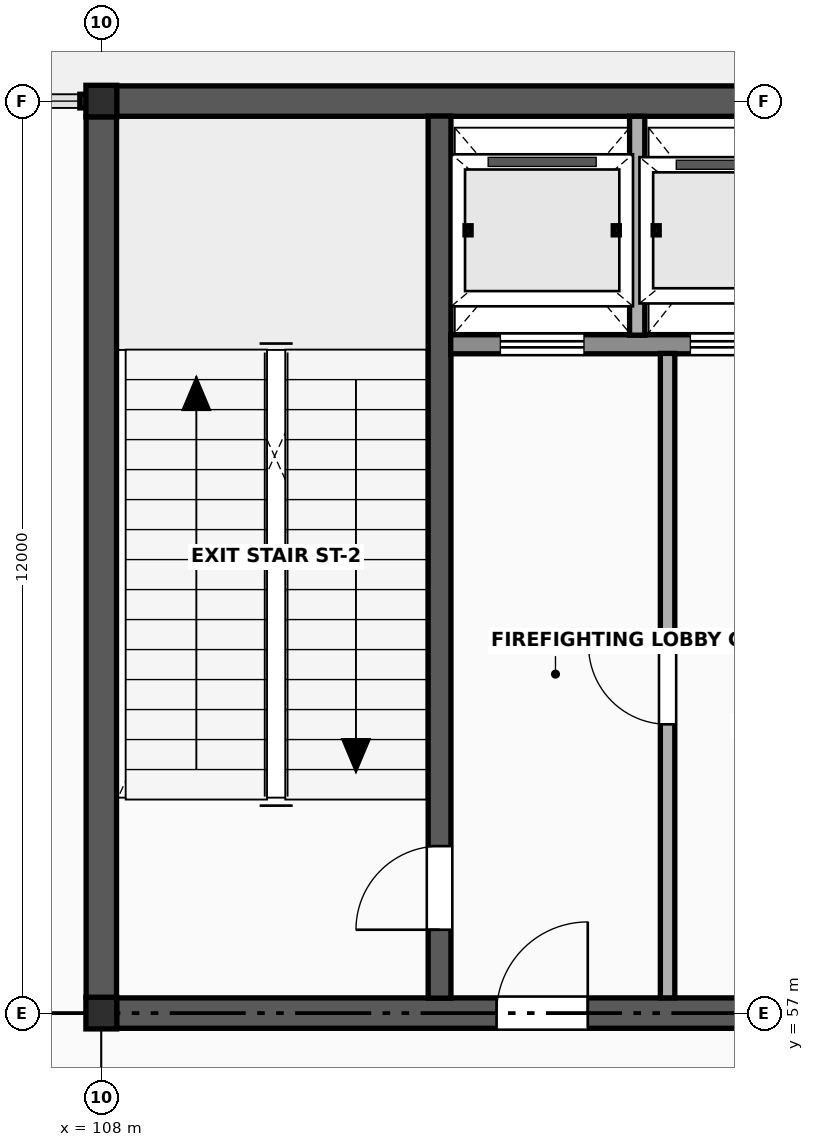
"""IFC4 building model, lengths in metres.
Left out: names, types, materials, properties, quantities, classifications, styles, units other than length and angle.
Written with IfcOpenShell. Run it as: python <this file> out.ifc"""

import sys

from ifc_helpers import new_model, si_unit, direction, frame, frame_2d, origin, origin_2d, place, context, subcontext, project, spatial, rectangle, i_section, extrude, element, fill, save


model = new_model("IFC4")
c1 = context("Model", 3, precision=1e-05, world=origin(), true_north=direction((0.0, 1.0)))
c2 = subcontext(c1, "Body", "Model", "MODEL_VIEW")
j1 = project(units=[si_unit("LENGTHUNIT", "METRE"), si_unit("PLANEANGLEUNIT", "RADIAN")], contexts=[c1])
p1 = place(None, origin())
s1 = spatial("IfcSite", under=j1, at=p1, CompositionType="ELEMENT")
p2 = place(p1, origin())
s2 = spatial("IfcBuilding", under=s1, at=p2, CompositionType="ELEMENT")
p3 = place(p2, frame((0.0, 0.0, 32.4)))
s3 = spatial("IfcBuildingStorey", under=s2, at=p3, CompositionType="ELEMENT", Elevation=32.4)
for number, where, z_axis, x_axis in (
    (1, (108.0, 57.0, 0.0), (0.0, 0.0, 1.0), (1.0, 0.0, 0.0)),
    (2, (108.0, 69.0, 0.0), (0.0, 0.0, 1.0), (1.0, 0.0, 0.0)),
):
    element("IfcColumn", number, at=place(p3, frame(where, z_axis=z_axis, x_axis=x_axis)), inside=s3, PredefinedType="COLUMN", context=c2, shape_type="SweptSolid", body=[
        extrude(i_section(OverallWidth=0.406, OverallDepth=0.416, WebThickness=0.03, FlangeThickness=0.048, FilletRadius=0.018, at=origin_2d()), origin(), (0.0, 0.0, 1.0), 5.2),
    ])
p4 = place(p3, frame((108.2, 57.0, 0.0), z_axis=(0.0, 0.0, 1.0), x_axis=(1.0, 0.0, 0.0)))
e3 = element("IfcWall", 3, at=p4, inside=s3, PredefinedType="SHEAR", context=c2, shape_type="SweptSolid", body=[
    extrude(rectangle(XDim=11.6, YDim=0.4, at=frame_2d((5.8, 0.0))), origin(), (0.0, 0.0, 1.0), 5.043),
])
p5 = place(p4, frame((5.0, 0.0, 0.0)))
e4 = element("IfcOpeningElement", 4, at=p5, cuts=e3, PredefinedType="OPENING", context=c2, shape_type="SweptSolid", body=[
    extrude(rectangle(XDim=1.2, YDim=2.2, at=frame_2d((0.6, 1.1))), frame((0.0, 0.215, 0.0), z_axis=(0.0, -1.0, 0.0), x_axis=(1.0, 0.0, 0.0)), (0.0, 0.0, 1.0), 0.43),
])
p6 = place(p4, frame((8.7, 0.0, 0.0)))
e5 = element("IfcOpeningElement", 5, at=p6, cuts=e3, PredefinedType="OPENING", context=c2, shape_type="SweptSolid", body=[
    extrude(rectangle(XDim=1.5, YDim=2.25, at=frame_2d((0.75, 1.125))), frame((0.0, 0.215, 0.0), z_axis=(0.0, -1.0, 0.0), x_axis=(1.0, 0.0, 0.0)), (0.0, 0.0, 1.0), 0.43),
])
p7 = place(p3, frame((108.2, 69.0, 0.0), z_axis=(0.0, 0.0, 1.0), x_axis=(1.0, 0.0, 0.0)))
e6 = element("IfcWall", 6, at=p7, inside=s3, PredefinedType="SHEAR", context=c2, shape_type="SweptSolid", body=[
    extrude(rectangle(XDim=11.6, YDim=0.4, at=frame_2d((5.8, 0.0))), origin(), (0.0, 0.0, 1.0), 5.043),
])
p8 = place(p3, frame((108.0, 57.205, 0.0), z_axis=(0.0, 0.0, 1.0), x_axis=(0.0, 1.0, 0.0)))
e7 = element("IfcWall", 7, at=p8, inside=s3, PredefinedType="SHEAR", context=c2, shape_type="SweptSolid", body=[
    extrude(rectangle(XDim=11.59, YDim=0.4, at=frame_2d((5.795, 0.0))), origin(), (0.0, 0.0, 1.0), 5.043),
])
p9 = place(p3, frame((112.45, 57.197, 0.0), z_axis=(0.0, 0.0, 1.0), x_axis=(0.0, 1.0, 0.0)))
e8 = element("IfcWall", 8, at=p9, inside=s3, PredefinedType="SHEAR", context=c2, shape_type="SweptSolid", body=[
    extrude(rectangle(XDim=11.606, YDim=0.3, at=frame_2d((5.803, 0.0))), origin(), (0.0, 0.0, 1.0), 5.043),
])
p10 = place(p9, frame((0.9, 0.0, 0.0)))
e9 = element("IfcOpeningElement", 9, at=p10, cuts=e8, PredefinedType="OPENING", context=c2, shape_type="SweptSolid", body=[
    extrude(rectangle(XDim=1.1, YDim=2.2, at=frame_2d((0.55, 1.1))), frame((0.0, 0.165, 0.0), z_axis=(0.0, -1.0, 0.0), x_axis=(1.0, 0.0, 0.0)), (0.0, 0.0, 1.0), 0.33),
])
p11 = place(p3, frame((112.597, 65.8, 0.0), z_axis=(0.0, 0.0, 1.0), x_axis=(1.0, 0.0, 0.0)))
e10 = element("IfcWall", 10, at=p11, inside=s3, PredefinedType="SOLIDWALL", context=c2, shape_type="SweptSolid", body=[
    extrude(rectangle(XDim=7.206, YDim=0.25, at=frame_2d((3.603, 0.0))), origin(), (0.0, 0.0, 1.0), 5.043),
])
p12 = place(p11, frame((0.653, 0.0, 0.0)))
e11 = element("IfcOpeningElement", 11, at=p12, cuts=e10, PredefinedType="OPENING", context=c2, shape_type="SweptSolid", body=[
    extrude(rectangle(XDim=1.1, YDim=2.24, at=frame_2d((0.55, 1.12))), frame((0.0, 0.14, 0.0), z_axis=(0.0, -1.0, 0.0), x_axis=(1.0, 0.0, 0.0)), (0.0, 0.0, 1.0), 0.28),
])
p13 = place(p11, frame((3.153, 0.0, 0.0)))
e12 = element("IfcOpeningElement", 12, at=p13, cuts=e10, PredefinedType="OPENING", context=c2, shape_type="SweptSolid", body=[
    extrude(rectangle(XDim=1.05, YDim=2.2, at=frame_2d((0.525, 1.1))), frame((0.0, 0.14, 0.0), z_axis=(0.0, -1.0, 0.0), x_axis=(1.0, 0.0, 0.0)), (0.0, 0.0, 1.0), 0.28),
])
p14 = place(p11, frame((5.528, 0.0, 0.0)))
e13 = element("IfcOpeningElement", 13, at=p14, cuts=e10, PredefinedType="OPENING", context=c2, shape_type="SweptSolid", body=[
    extrude(rectangle(XDim=1.05, YDim=2.2, at=frame_2d((0.525, 1.1))), frame((0.0, 0.14, 0.0), z_axis=(0.0, -1.0, 0.0), x_axis=(1.0, 0.0, 0.0)), (0.0, 0.0, 1.0), 0.28),
])
p15 = place(p3, frame((115.05, 65.92, 0.0), z_axis=(0.0, 0.0, 1.0), x_axis=(0.0, 1.0, 0.0)))
e14 = element("IfcWall", 14, at=p15, inside=s3, PredefinedType="SOLIDWALL", context=c2, shape_type="SweptSolid", body=[
    extrude(rectangle(XDim=2.88, YDim=0.2, at=frame_2d((1.44, 0.0))), origin(), (0.0, 0.0, 1.0), 5.033),
])
p16 = place(p3, frame((115.45, 57.2, 0.0), z_axis=(0.0, 0.0, 1.0), x_axis=(0.0, 1.0, 0.0)))
e15 = element("IfcWall", 15, at=p16, inside=s3, PredefinedType="SOLIDWALL", context=c2, shape_type="SweptSolid", body=[
    extrude(rectangle(XDim=8.48, YDim=0.19, at=frame_2d((4.24, 0.0))), origin(), (0.0, 0.0, 1.0), 5.033),
])
p17 = place(p16, frame((3.6, 0.0, 0.0)))
e16 = element("IfcOpeningElement", 16, at=p17, cuts=e15, PredefinedType="OPENING", context=c2, shape_type="SweptSolid", body=[
    extrude(rectangle(XDim=1.04, YDim=2.18, at=frame_2d((0.52, 1.09))), frame((0.0, 0.11, 0.0), z_axis=(0.0, -1.0, 0.0), x_axis=(1.0, 0.0, 0.0)), (0.0, 0.0, 1.0), 0.22),
])
p18 = place(p10, origin())
e17 = element("IfcDoor", 17, at=p18, inside=s3, OperationType="SINGLE_SWING_LEFT", PredefinedType="DOOR", context=c2, shape_type="SweptSolid", body=[
    extrude(rectangle(XDim=1.1, YDim=2.2, at=frame_2d((0.55, 1.1))), frame((0.0, 0.025, 0.0), z_axis=(0.0, -1.0, 0.0), x_axis=(1.0, 0.0, 0.0)), (0.0, 0.0, 1.0), 0.05),
])
fill(e9, e17)
p19 = place(p17, origin())
e18 = element("IfcDoor", 18, at=p19, inside=s3, OperationType="SINGLE_SWING_RIGHT", PredefinedType="DOOR", context=c2, shape_type="SweptSolid", body=[
    extrude(rectangle(XDim=1.04, YDim=2.18, at=frame_2d((0.52, 1.09))), frame((0.0, 0.025, 0.0), z_axis=(0.0, -1.0, 0.0), x_axis=(1.0, 0.0, 0.0)), (0.0, 0.0, 1.0), 0.05),
])
fill(e16, e18)
p20 = place(p5, origin())
e19 = element("IfcDoor", 19, at=p20, inside=s3, OperationType="SINGLE_SWING_RIGHT", PredefinedType="DOOR", context=c2, shape_type="SweptSolid", body=[
    extrude(rectangle(XDim=1.2, YDim=2.2, at=frame_2d((0.6, 1.1))), frame((0.0, 0.025, 0.0), z_axis=(0.0, -1.0, 0.0), x_axis=(1.0, 0.0, 0.0)), (0.0, 0.0, 1.0), 0.05),
])
fill(e4, e19)
p21 = place(p12, origin())
e20 = element("IfcDoor", 20, at=p21, inside=s3, OperationType="SLIDING_TO_LEFT", PredefinedType="USERDEFINED", context=c2, shape_type="SweptSolid", body=[
    extrude(rectangle(XDim=1.1, YDim=2.24, at=frame_2d((0.55, 1.12))), frame((0.0, 0.025, 0.0), z_axis=(0.0, -1.0, 0.0), x_axis=(1.0, 0.0, 0.0)), (0.0, 0.0, 1.0), 0.05),
])
fill(e11, e20)
p22 = place(p13, origin())
e21 = element("IfcDoor", 21, at=p22, inside=s3, OperationType="SLIDING_TO_LEFT", PredefinedType="USERDEFINED", context=c2, shape_type="SweptSolid", body=[
    extrude(rectangle(XDim=1.05, YDim=2.2, at=frame_2d((0.525, 1.1))), frame((0.0, 0.025, 0.0), z_axis=(0.0, -1.0, 0.0), x_axis=(1.0, 0.0, 0.0)), (0.0, 0.0, 1.0), 0.05),
])
fill(e12, e21)
save(model, sys.argv[1])
